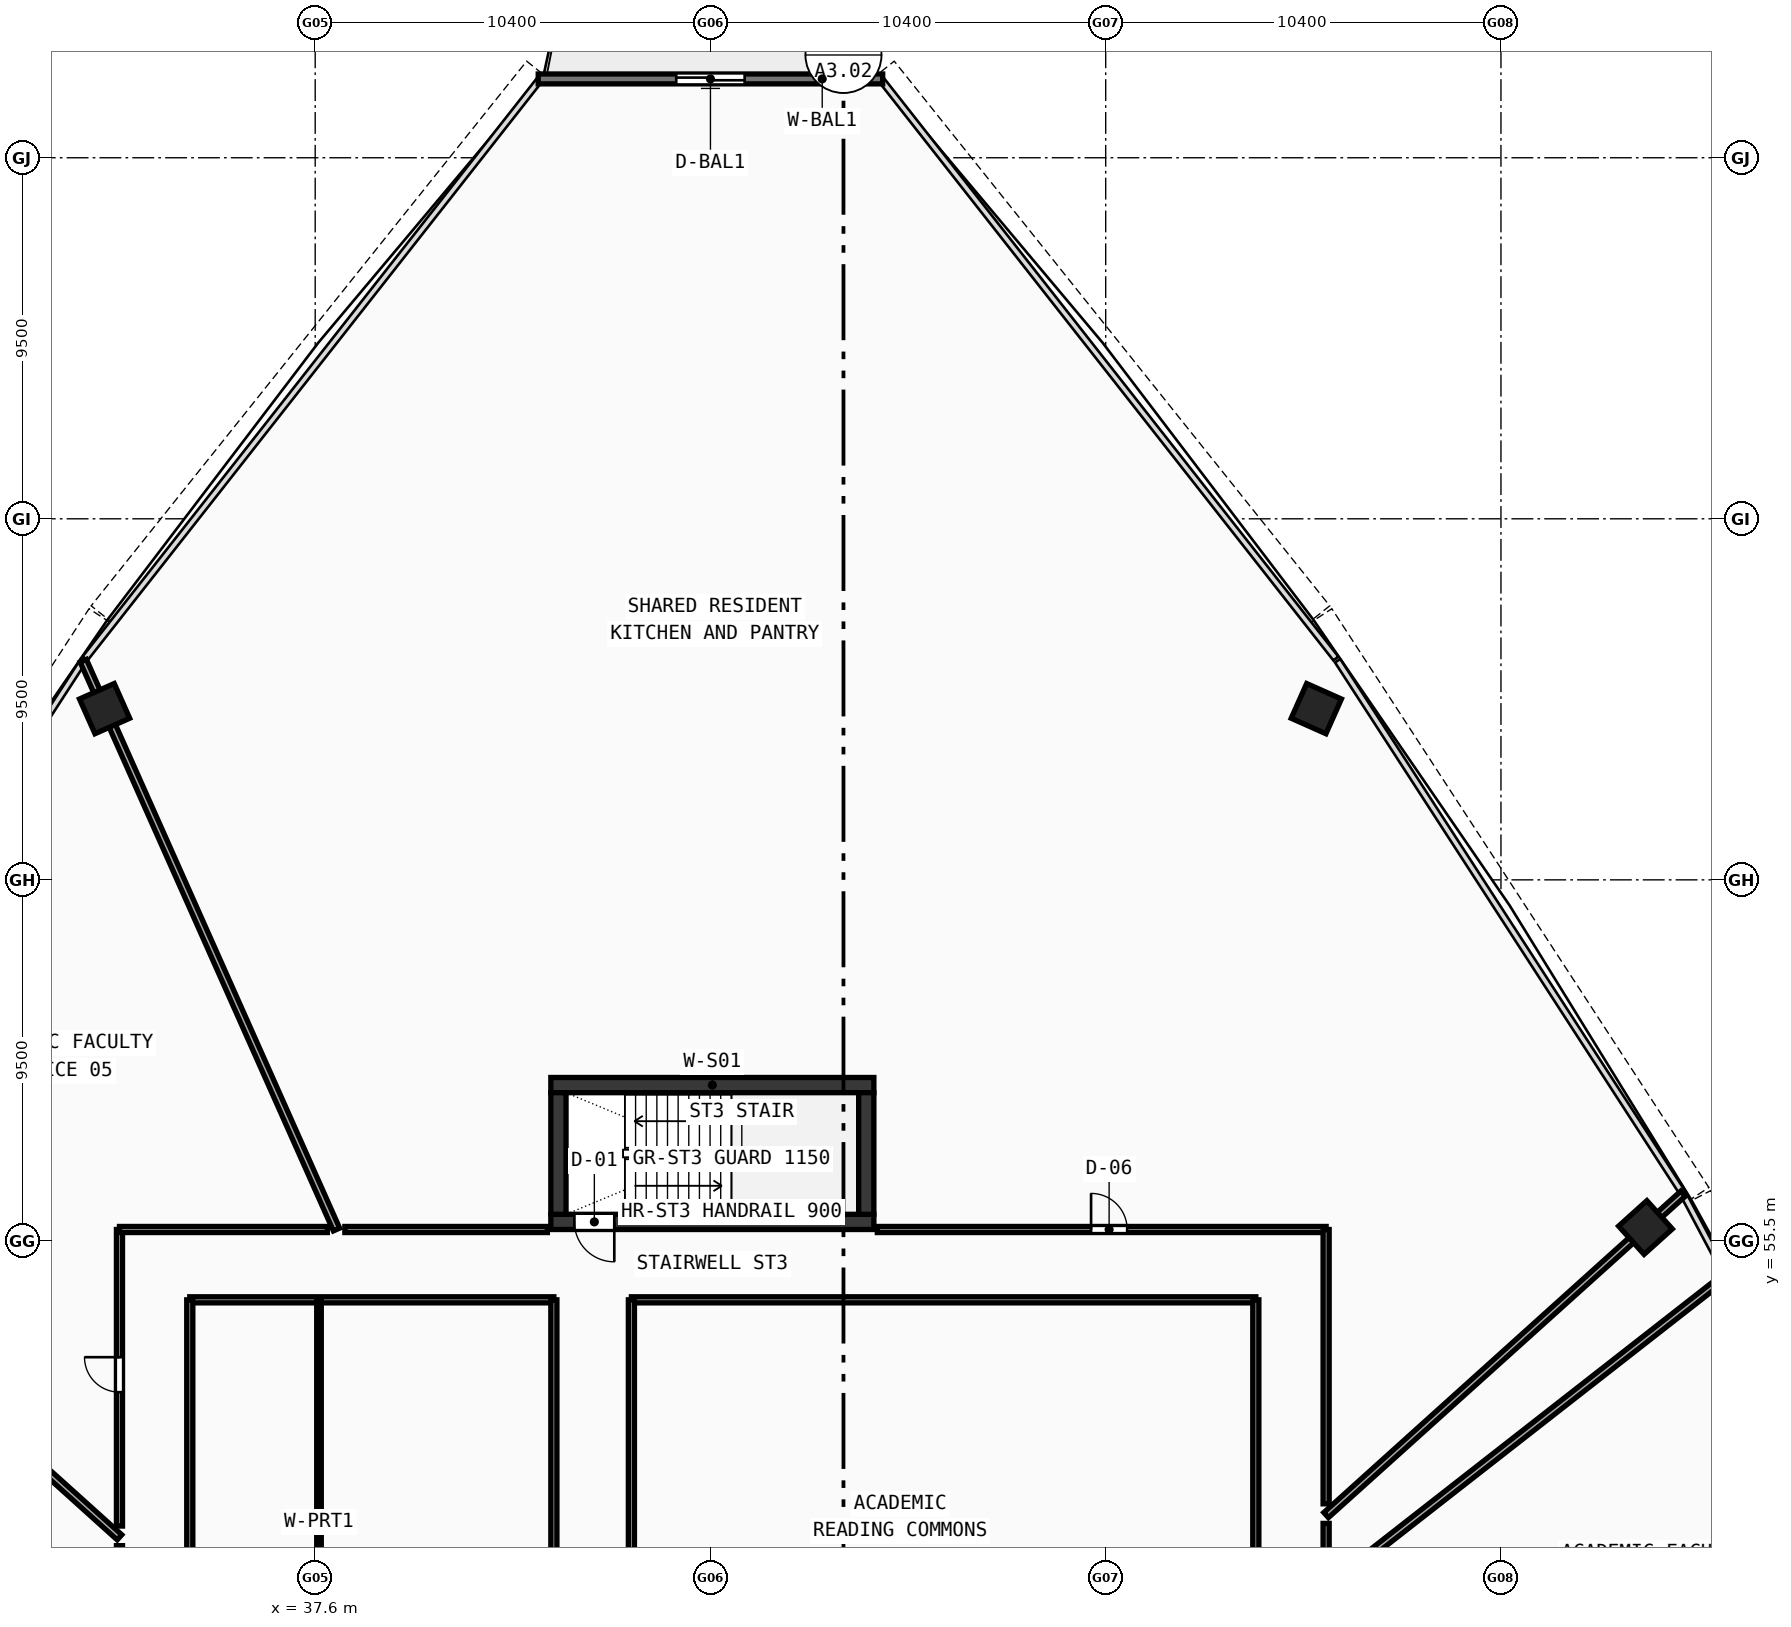
"""IFC4 building model, lengths in metres.
Left out: names, types, materials, properties, quantities, classifications, styles, units other than length and angle.
Written with IfcOpenShell. Run it as: python <this file> out.ifc"""

import sys

from ifc_helpers import new_model, si_unit, direction, frame, frame_2d, origin, origin_with_axes, origin_2d, place, context, subcontext, project, spatial, rectangle, hollow_rectangle, extrude, source, transform, mapped, element, fill, save


model = new_model("IFC4")
c1 = context("Model", 3, precision=1e-05, world=origin(), true_north=direction((0.0, 1.0)))
c2 = subcontext(c1, "Body", "Model", "MODEL_VIEW")
j1 = project(units=[si_unit("LENGTHUNIT", "METRE"), si_unit("PLANEANGLEUNIT", "RADIAN")], contexts=[c1])
p1 = place(None, origin())
s1 = spatial("IfcSite", under=j1, at=p1, CompositionType="ELEMENT")
p2 = place(p1, origin())
s2 = spatial("IfcBuilding", under=s1, at=p2, CompositionType="ELEMENT")
p3 = place(p2, frame((0.0, 0.0, 115.38)))
s3 = spatial("IfcBuildingStorey", under=s2, at=p3, CompositionType="ELEMENT", Elevation=115.38)
p4 = place(p3, frame((43.8, 59.6, 0.0), z_axis=(0.0, 0.0, 1.0), x_axis=(1.0, 0.0, 0.0)))
e1 = element("IfcWall", 1, at=p4, inside=s3, PredefinedType="SHEAR", context=c2, shape_type="SweptSolid", body=[
    extrude(rectangle(XDim=8.5, YDim=0.4, at=frame_2d((4.25, 0.0))), origin(), (0.0, 0.0, 1.0), 3.52),
])
p5 = place(p3, frame((43.8, 56.0, 0.0), z_axis=(0.0, 0.0, 1.0), x_axis=(1.0, 0.0, 0.0)))
e2 = element("IfcWall", 2, at=p5, inside=s3, PredefinedType="SHEAR", context=c2, shape_type="SweptSolid", body=[
    extrude(rectangle(XDim=8.5, YDim=0.4, at=frame_2d((4.25, 0.0))), origin(), (0.0, 0.0, 1.0), 3.52),
])
p6 = place(p5, frame((0.62, 0.0, 0.0)))
e3 = element("IfcOpeningElement", 3, at=p6, cuts=e2, PredefinedType="OPENING", context=c2, shape_type="SweptSolid", body=[
    extrude(rectangle(XDim=1.05, YDim=2.1, at=frame_2d((0.525, 1.05))), frame((0.0, 0.21, 0.0), z_axis=(0.0, -1.0, 0.0), x_axis=(1.0, 0.0, 0.0)), (0.0, 0.0, 1.0), 0.42),
])
for number, where, z_axis, x_axis in (
    (4, (44.0, 56.2, 0.0), (0.0, 0.0, 1.0), (0.0, 1.0, 0.0)),
    (5, (52.1, 56.2, 0.0), (0.0, 0.0, 1.0), (0.0, 1.0, 0.0)),
):
    element("IfcWall", number, at=place(p3, frame(where, z_axis=z_axis, x_axis=x_axis)), inside=s3, PredefinedType="SHEAR", context=c2, shape_type="SweptSolid", body=[
        extrude(rectangle(XDim=3.2, YDim=0.4, at=frame_2d((1.6, 0.0))), origin(), (0.0, 0.0, 1.0), 3.52),
    ])
m1 = source(origin(), c2, "Body", "SweptSolid", [
    extrude(hollow_rectangle(XDim=1.0, YDim=1.0, WallThickness=0.042, at=origin_2d()), origin(), (0.0, 0.0, 1.0), 3.78),
])
for number, where, z_axis, x_axis in (
    (6, (72.603, 55.852, -0.26), (0.0, 0.0, 1.0), (-0.669, 0.743, 0.0)),
    (7, (63.941, 69.505, -0.26), (0.0, 0.0, 1.0), (-0.914, 0.407, 0.0)),
    (8, (32.059, 69.505, -0.26), (0.0, 0.0, 1.0), (-0.914, -0.407, 0.0)),
):
    element("IfcColumn", number, at=place(p3, frame(where, z_axis=z_axis, x_axis=x_axis)), inside=s3, PredefinedType="COLUMN", context=c2, shape_type="MappedRepresentation", body=[
        mapped(m1, transform((0.0, 0.0, 0.0), scale=1.0)),
    ])
p7 = place(p3, frame((52.532, 86.074, 0.0), z_axis=(0.0, 0.0, 1.0), x_axis=(-1.0, 0.0, 0.0)))
e9 = element("IfcWall", 9, at=p7, inside=s3, PredefinedType="STANDARD", context=c2, shape_type="SweptSolid", body=[
    extrude(rectangle(XDim=9.063, YDim=0.26, at=frame_2d((4.532, 0.0))), origin(), (0.0, 0.0, 1.0), 3.52),
])
p8 = place(p7, frame((3.632, 0.0, 0.0)))
e10 = element("IfcOpeningElement", 10, at=p8, cuts=e9, PredefinedType="OPENING", context=c2, shape_type="SweptSolid", body=[
    extrude(rectangle(XDim=1.8, YDim=2.15, at=frame_2d((0.9, 1.075))), frame((0.0, 0.14, 0.0), z_axis=(0.0, -1.0, 0.0), x_axis=(1.0, 0.0, 0.0)), (0.0, 0.0, 1.0), 0.28),
])
p9 = place(p3, frame((34.3, 53.95, 0.0), z_axis=(0.0, 0.0, 1.0), x_axis=(1.0, 0.0, 0.0)))
e11 = element("IfcWall", 11, at=p9, inside=s3, PredefinedType="PARTITIONING", context=c2, shape_type="SweptSolid", body=[
    extrude(rectangle(XDim=9.58, YDim=0.16, at=frame_2d((4.79, 0.0))), origin(), (0.0, 0.0, 1.0), 2.82),
])
for number, where, z_axis, x_axis in (
    (12, (34.3, 42.25, 0.0), (0.0, 0.0, 1.0), (0.0, 1.0, 0.0)),
    (13, (43.88, 42.25, 0.0), (0.0, 0.0, 1.0), (0.0, 1.0, 0.0)),
):
    element("IfcWall", number, at=place(p3, frame(where, z_axis=z_axis, x_axis=x_axis)), inside=s3, PredefinedType="PARTITIONING", context=c2, shape_type="SweptSolid", body=[
        extrude(rectangle(XDim=11.7, YDim=0.16, at=frame_2d((5.85, 0.0))), origin(), (0.0, 0.0, 1.0), 2.82),
    ])
p10 = place(p3, frame((37.7, 42.25, 0.0), z_axis=(0.0, 0.0, 1.0), x_axis=(0.0, 1.0, 0.0)))
e14 = element("IfcWall", 14, at=p10, inside=s3, PredefinedType="PARTITIONING", context=c2, shape_type="SweptSolid", body=[
    extrude(rectangle(XDim=11.7, YDim=0.12, at=frame_2d((5.85, 0.0))), origin(), (0.0, 0.0, 1.0), 2.82),
])
p11 = place(p3, frame((45.92, 53.95, 0.0), z_axis=(0.0, 0.0, 1.0), x_axis=(1.0, 0.0, 0.0)))
e15 = element("IfcWall", 15, at=p11, inside=s3, PredefinedType="PARTITIONING", context=c2, shape_type="SweptSolid", body=[
    extrude(rectangle(XDim=16.43, YDim=0.16, at=frame_2d((8.215, 0.0))), origin(), (0.0, 0.0, 1.0), 2.82),
])
p12 = place(p3, frame((45.92, 42.25, 0.0), z_axis=(0.0, 0.0, 1.0), x_axis=(0.0, 1.0, 0.0)))
e16 = element("IfcWall", 16, at=p12, inside=s3, PredefinedType="PARTITIONING", context=c2, shape_type="SweptSolid", body=[
    extrude(rectangle(XDim=11.7, YDim=0.16, at=frame_2d((5.85, 0.0))), origin(), (0.0, 0.0, 1.0), 3.12),
])
p13 = place(p3, frame((62.35, 42.25, 0.0), z_axis=(0.0, 0.0, 1.0), x_axis=(0.0, 1.0, 0.0)))
e17 = element("IfcWall", 17, at=p13, inside=s3, PredefinedType="PARTITIONING", context=c2, shape_type="SweptSolid", body=[
    extrude(rectangle(XDim=11.7, YDim=0.16, at=frame_2d((5.85, 0.0))), origin(), (0.0, 0.0, 1.0), 2.82),
])
p14 = place(p3, frame((64.2, 46.357, 0.0), z_axis=(0.0, 0.0, 1.0), x_axis=(0.788007209352, 0.615666011738, 0.0)))
e18 = element("IfcWall", 18, at=p14, inside=s3, PredefinedType="PARTITIONING", context=c2, shape_type="SweptSolid", body=[
    extrude(rectangle(XDim=13.37, YDim=0.18, at=frame_2d((6.685, 0.0))), origin(), (0.0, 0.0, 1.0), 2.82),
])
p15 = place(p3, frame((64.2, 48.287, 0.0), z_axis=(0.0, 0.0, 1.0), x_axis=(0.743140441227, 0.66913547553, 0.0)))
e19 = element("IfcWall", 19, at=p15, inside=s3, PredefinedType="PARTITIONING", context=c2, shape_type="SweptSolid", body=[
    extrude(rectangle(XDim=12.638, YDim=0.18, at=frame_2d((6.319, 0.0))), origin(), (0.0, 0.0, 1.0), 2.82),
])
p16 = place(p3, frame((38.16, 55.8, 0.0), z_axis=(0.0, 0.0, 1.0), x_axis=(-0.406727469891, 0.913549541753, 0.0)))
e20 = element("IfcWall", 20, at=p16, inside=s3, PredefinedType="PARTITIONING", context=c2, shape_type="SweptSolid", body=[
    extrude(rectangle(XDim=16.381, YDim=0.18, at=frame_2d((8.19, 0.0))), origin(), (0.0, 0.0, 1.0), 2.82),
])
p17 = place(p3, frame((32.45, 47.701, 0.0), z_axis=(0.0, 0.0, 1.0), x_axis=(-0.743139607037, 0.669136401979, 0.0)))
e21 = element("IfcWall", 21, at=p17, inside=s3, PredefinedType="PARTITIONING", context=c2, shape_type="SweptSolid", body=[
    extrude(rectangle(XDim=13.513, YDim=0.18, at=frame_2d((6.756, 0.0))), origin(), (0.0, 0.0, 1.0), 2.82),
])
p18 = place(p3, frame((32.45, 40.22, 0.0), z_axis=(0.0, 0.0, 1.0), x_axis=(0.0, 1.0, 0.0)))
e22 = element("IfcWall", 22, at=p18, inside=s3, PredefinedType="PARTITIONING", context=c2, shape_type="SweptSolid", body=[
    extrude(rectangle(XDim=7.262, YDim=0.16, at=frame_2d((3.631, 0.0))), origin(), (0.0, 0.0, 1.0), 2.82),
])
p19 = place(p18, frame((3.162, 0.0, 0.0)))
e23 = element("IfcOpeningElement", 23, at=p19, cuts=e22, PredefinedType="OPENING", context=c2, shape_type="SweptSolid", body=[
    extrude(rectangle(XDim=0.92, YDim=2.1, at=frame_2d((0.46, 1.05))), frame((0.0, 0.09, 0.0), z_axis=(0.0, -1.0, 0.0), x_axis=(1.0, 0.0, 0.0)), (0.0, 0.0, 1.0), 0.18),
])
p20 = place(p3, frame((32.45, 47.997, 0.0), z_axis=(0.0, 0.0, 1.0), x_axis=(0.0, 1.0, 0.0)))
e24 = element("IfcWall", 24, at=p20, inside=s3, PredefinedType="PARTITIONING", context=c2, shape_type="SweptSolid", body=[
    extrude(rectangle(XDim=7.803, YDim=0.16, at=frame_2d((3.901, 0.0))), origin(), (0.0, 0.0, 1.0), 3.12),
])
p21 = place(p20, frame((3.523, 0.0, 0.0)))
e25 = element("IfcOpeningElement", 25, at=p21, cuts=e24, PredefinedType="OPENING", context=c2, shape_type="SweptSolid", body=[
    extrude(rectangle(XDim=0.92, YDim=2.1, at=frame_2d((0.46, 1.05))), frame((0.0, 0.09, 0.0), z_axis=(0.0, -1.0, 0.0), x_axis=(1.0, 0.0, 0.0)), (0.0, 0.0, 1.0), 0.18),
])
p22 = place(p3, frame((32.45, 55.8, 0.0), z_axis=(0.0, 0.0, 1.0), x_axis=(1.0, 0.0, 0.0)))
e26 = element("IfcWall", 26, at=p22, inside=s3, PredefinedType="PARTITIONING", context=c2, shape_type="SweptSolid", body=[
    extrude(rectangle(XDim=5.47, YDim=0.16, at=frame_2d((2.735, 0.0))), origin(), (0.0, 0.0, 1.0), 3.12),
])
p23 = place(p3, frame((38.38, 55.8, 0.0), z_axis=(0.0, 0.0, 1.0), x_axis=(1.0, 0.0, 0.0)))
e27 = element("IfcWall", 27, at=p23, inside=s3, PredefinedType="PARTITIONING", context=c2, shape_type="SweptSolid", body=[
    extrude(rectangle(XDim=5.329, YDim=0.16, at=frame_2d((2.665, 0.0))), origin(), (0.0, 0.0, 1.0), 2.82),
])
p24 = place(p3, frame((52.391, 55.8, 0.0), z_axis=(0.0, 0.0, 1.0), x_axis=(1.0, 0.0, 0.0)))
e28 = element("IfcWall", 28, at=p24, inside=s3, PredefinedType="PARTITIONING", context=c2, shape_type="SweptSolid", body=[
    extrude(rectangle(XDim=11.809, YDim=0.16, at=frame_2d((5.904, 0.0))), origin(), (0.0, 0.0, 1.0), 2.82),
])
p25 = place(p24, frame((5.624, 0.0, 0.0)))
e29 = element("IfcOpeningElement", 29, at=p25, cuts=e28, PredefinedType="OPENING", context=c2, shape_type="SweptSolid", body=[
    extrude(rectangle(XDim=0.95, YDim=2.1, at=frame_2d((0.475, 1.05))), frame((0.0, 0.09, 0.0), z_axis=(0.0, -1.0, 0.0), x_axis=(1.0, 0.0, 0.0)), (0.0, 0.0, 1.0), 0.18),
])
p26 = place(p3, frame((64.2, 55.8, 0.0), z_axis=(0.0, 0.0, 1.0), x_axis=(0.0, -1.0, 0.0)))
e30 = element("IfcWall", 30, at=p26, inside=s3, PredefinedType="PARTITIONING", context=c2, shape_type="SweptSolid", body=[
    extrude(rectangle(XDim=7.218, YDim=0.16, at=frame_2d((3.609, 0.0))), origin(), (0.0, 0.0, 1.0), 3.12),
])
p27 = place(p3, frame((64.2, 48.067, 0.0), z_axis=(0.0, 0.0, 1.0), x_axis=(0.0, -1.0, 0.0)))
e31 = element("IfcWall", 31, at=p27, inside=s3, PredefinedType="PARTITIONING", context=c2, shape_type="SweptSolid", body=[
    extrude(rectangle(XDim=1.431, YDim=0.16, at=frame_2d((0.715, 0.0))), origin(), (0.0, 0.0, 1.0), 2.82),
])
m2 = source(origin(), c2, "Body", "SweptSolid", [
    extrude(rectangle(XDim=1.8, YDim=2.15, at=frame_2d((0.9, 1.075))), frame((0.0, 0.025, 0.0), z_axis=(0.0, -1.0, 0.0), x_axis=(1.0, 0.0, 0.0)), (0.0, 0.0, 1.0), 0.05),
])
p28 = place(p8, origin_with_axes())
e32 = element("IfcDoor", 32, at=p28, inside=s3, OperationType="DOUBLE_DOOR_SLIDING", PredefinedType="DOOR", context=c2, shape_type="MappedRepresentation", body=[
    mapped(m2, transform((0.0, 0.0, 0.0), scale=1.0)),
])
fill(e10, e32)
m3 = source(origin(), c2, "Body", "SweptSolid", [
    extrude(rectangle(XDim=1.05, YDim=2.1, at=frame_2d((0.525, 1.05))), frame((0.0, 0.025, 0.0), z_axis=(0.0, -1.0, 0.0), x_axis=(1.0, 0.0, 0.0)), (0.0, 0.0, 1.0), 0.05),
])
p29 = place(p6, frame((1.05, 0.0, 0.0), z_axis=(0.0, 0.0, 1.0), x_axis=(-1.0, 0.0, 0.0)))
e33 = element("IfcDoor", 33, at=p29, inside=s3, OperationType="SINGLE_SWING_LEFT", PredefinedType="DOOR", context=c2, shape_type="MappedRepresentation", body=[
    mapped(m3, transform((0.0, 0.0, 0.0), scale=1.0)),
])
fill(e3, e33)
m4 = source(origin(), c2, "Body", "SweptSolid", [
    extrude(rectangle(XDim=0.95, YDim=2.1, at=frame_2d((0.475, 1.05))), frame((0.0, 0.025, 0.0), z_axis=(0.0, -1.0, 0.0), x_axis=(1.0, 0.0, 0.0)), (0.0, 0.0, 1.0), 0.05),
])
p30 = place(p25, origin_with_axes())
e34 = element("IfcDoor", 34, at=p30, inside=s3, OperationType="SINGLE_SWING_LEFT", PredefinedType="DOOR", context=c2, shape_type="MappedRepresentation", body=[
    mapped(m4, transform((0.0, 0.0, 0.0), scale=1.0)),
])
fill(e29, e34)
m5 = source(origin(), c2, "Body", "SweptSolid", [
    extrude(rectangle(XDim=0.92, YDim=2.1, at=frame_2d((0.46, 1.05))), frame((0.0, 0.025, 0.0), z_axis=(0.0, -1.0, 0.0), x_axis=(1.0, 0.0, 0.0)), (0.0, 0.0, 1.0), 0.05),
])
p31 = place(p21, origin_with_axes())
e35 = element("IfcDoor", 35, at=p31, inside=s3, OperationType="SINGLE_SWING_RIGHT", PredefinedType="DOOR", context=c2, shape_type="MappedRepresentation", body=[
    mapped(m5, transform((0.0, 0.0, 0.0), scale=1.0)),
])
fill(e25, e35)
save(model, sys.argv[1])
